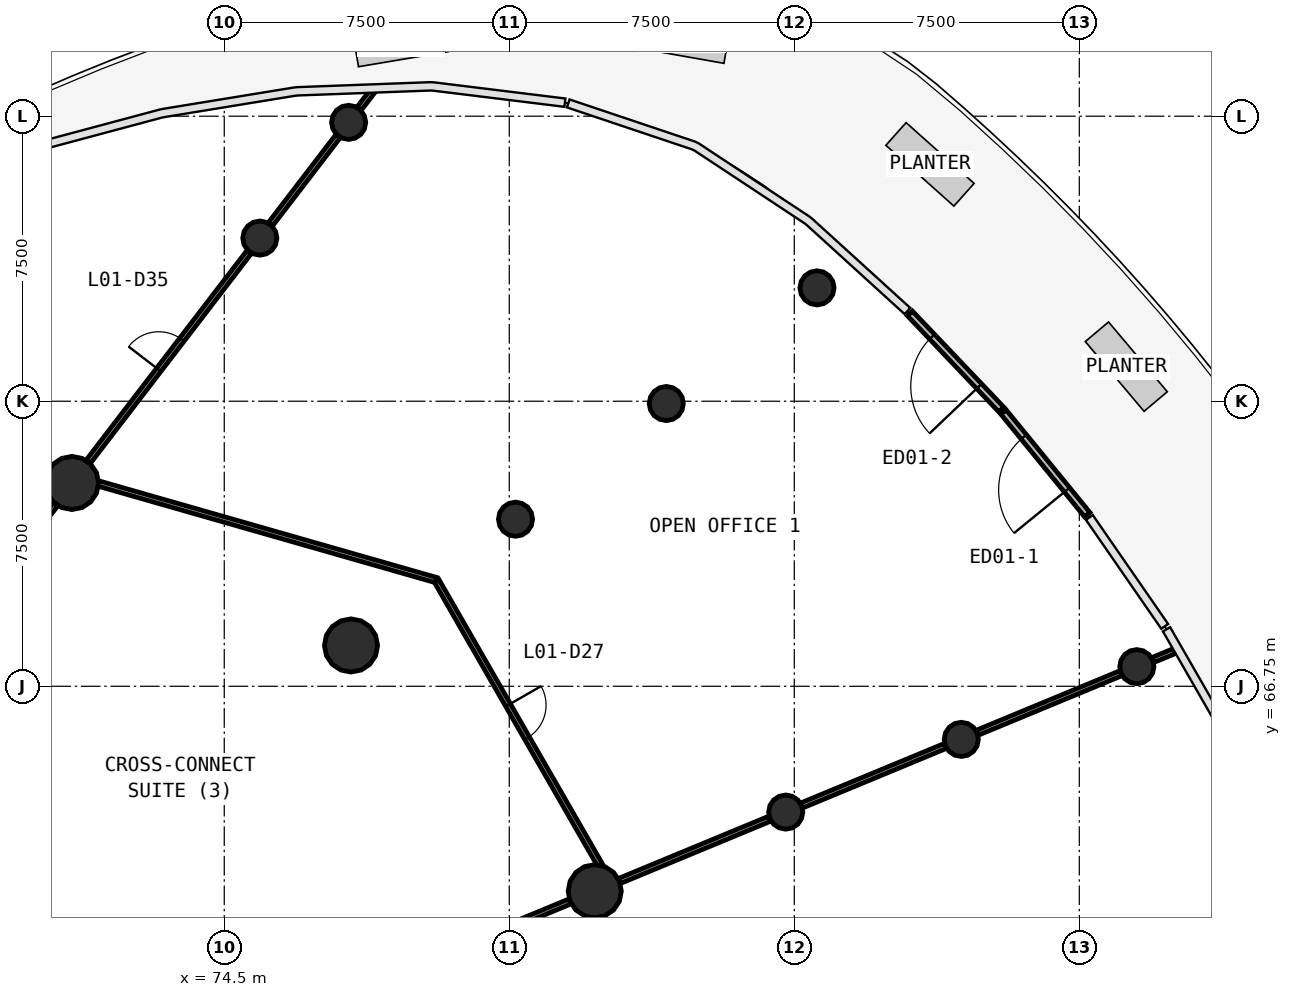
"""IFC4 building model, lengths in metres.
Left out: names, types, materials, properties, quantities, classifications, styles, units other than length and angle.
Written with IfcOpenShell. Run it as: python <this file> out.ifc"""

import sys

from ifc_helpers import new_model, si_unit, direction, frame, frame_2d, origin, origin_2d, place, context, subcontext, project, spatial, rectangle, circle, extrude, source, transform, mapped, element, fill, save


model = new_model("IFC4")
c1 = context("Model", 3, precision=1e-05, world=origin(), true_north=direction((0.0, 1.0)))
c2 = subcontext(c1, "Body", "Model", "MODEL_VIEW")
j1 = project(units=[si_unit("LENGTHUNIT", "METRE"), si_unit("PLANEANGLEUNIT", "RADIAN")], contexts=[c1])
p1 = place(None, origin())
s1 = spatial("IfcSite", under=j1, at=p1, CompositionType="ELEMENT")
p2 = place(p1, origin())
s2 = spatial("IfcBuilding", under=s1, at=p2, CompositionType="ELEMENT")
p3 = place(p2, frame((0.0, 0.0, 5.0)))
s3 = spatial("IfcBuildingStorey", under=s2, at=p3, CompositionType="ELEMENT", Elevation=5.0)
m1 = source(origin(), c2, "Body", "SweptSolid", [
    extrude(circle(Radius=0.7, at=origin_2d()), origin(), (0.0, 0.0, 1.0), 4.4),
])
for number, where, z_axis, x_axis in (
    (1, (84.249, 61.358, 0.0), (0.0, 0.0, 1.0), (1.0, 0.0, 0.0)),
    (2, (77.836, 67.824, 0.0), (0.0, 0.0, 1.0), (1.0, 0.0, 0.0)),
    (3, (70.492, 72.1, 0.0), (0.0, 0.0, 1.0), (1.0, 0.0, 0.0)),
):
    element("IfcColumn", number, at=place(p3, frame(where, z_axis=z_axis, x_axis=x_axis)), inside=s3, PredefinedType="COLUMN", context=c2, shape_type="MappedRepresentation", body=[
        mapped(m1, transform((0.0, 0.0, 0.0), scale=1.0)),
    ])
m2 = source(origin(), c2, "Body", "SweptSolid", [
    extrude(circle(Radius=0.45, at=origin_2d()), origin(), (0.0, 0.0, 1.0), 4.05),
])
for number, where, z_axis, x_axis in (
    (4, (98.513, 67.266, 0.0), (0.0, 0.0, 1.0), (1.0, 0.0, 0.0)),
    (5, (90.098, 77.233, 0.0), (0.0, 0.0, 1.0), (1.0, 0.0, 0.0)),
    (6, (77.773, 81.588, 0.0), (0.0, 0.0, 1.0), (1.0, 0.0, 0.0)),
):
    element("IfcColumn", number, at=place(p3, frame(where, z_axis=z_axis, x_axis=x_axis)), inside=s3, PredefinedType="COLUMN", context=c2, shape_type="MappedRepresentation", body=[
        mapped(m2, transform((0.0, 0.0, 0.0), scale=1.0)),
    ])
m3 = source(origin(), c2, "Body", "SweptSolid", [
    extrude(circle(Radius=0.45, at=origin_2d()), origin(), (0.0, 0.0, 1.0), 4.4),
])
for number, where, z_axis, x_axis in (
    (7, (93.894, 65.353, 0.0), (0.0, 0.0, 1.0), (1.0, 0.0, 0.0)),
    (8, (86.131, 74.19, 0.0), (0.0, 0.0, 1.0), (1.0, 0.0, 0.0)),
    (9, (75.436, 78.543, 0.0), (0.0, 0.0, 1.0), (1.0, 0.0, 0.0)),
    (10, (89.275, 63.44, 0.0), (0.0, 0.0, 1.0), (1.0, 0.0, 0.0)),
    (11, (82.165, 71.146, 0.0), (0.0, 0.0, 1.0), (1.0, 0.0, 0.0)),
):
    element("IfcColumn", number, at=place(p3, frame(where, z_axis=z_axis, x_axis=x_axis)), inside=s3, PredefinedType="COLUMN", context=c2, shape_type="MappedRepresentation", body=[
        mapped(m3, transform((0.0, 0.0, 0.0), scale=1.0)),
    ])
p4 = place(p3, frame((97.21, 71.265, 0.0), z_axis=(0.0, 0.0, 1.0), x_axis=(-0.632333608818, 0.77469620314, 0.0)))
e12 = element("IfcWall", 12, at=p4, inside=s3, PredefinedType="STANDARD", context=c2, shape_type="SweptSolid", body=[
    extrude(rectangle(XDim=3.486, YDim=0.18, at=frame_2d((1.743, 0.0))), origin(), (0.0, 0.0, 1.0), 4.05),
])
p5 = place(p4, frame((0.843, 0.0, 0.0)))
e13 = element("IfcOpeningElement", 13, at=p5, cuts=e12, PredefinedType="OPENING", context=c2, shape_type="SweptSolid", body=[
    extrude(rectangle(XDim=1.8, YDim=2.4, at=frame_2d((0.9, 1.2))), frame((0.0, 0.1, 0.0), z_axis=(0.0, -1.0, 0.0), x_axis=(1.0, 0.0, 0.0)), (0.0, 0.0, 1.0), 0.2),
])
p6 = place(p3, frame((94.946, 74.033, 0.0), z_axis=(0.0, 0.0, 1.0), x_axis=(-0.689168934046, 0.724600704075, 0.0)))
e14 = element("IfcWall", 14, at=p6, inside=s3, PredefinedType="STANDARD", context=c2, shape_type="SweptSolid", body=[
    extrude(rectangle(XDim=3.487, YDim=0.18, at=frame_2d((1.743, 0.0))), origin(), (0.0, 0.0, 1.0), 4.05),
])
p7 = place(p6, frame((0.843, 0.0, 0.0)))
e15 = element("IfcOpeningElement", 15, at=p7, cuts=e14, PredefinedType="OPENING", context=c2, shape_type="SweptSolid", body=[
    extrude(rectangle(XDim=1.8, YDim=2.4, at=frame_2d((0.9, 1.2))), frame((0.0, 0.1, 0.0), z_axis=(0.0, -1.0, 0.0), x_axis=(1.0, 0.0, 0.0)), (0.0, 0.0, 1.0), 0.2),
])
p8 = place(p3, frame((80.076, 69.544, 0.0), z_axis=(0.0, 0.0, 1.0), x_axis=(-0.961447102661, 0.27498994306, 0.0)))
e16 = element("IfcWall", 16, at=p8, inside=s3, PredefinedType="PARTITIONING", context=c2, shape_type="SweptSolid", body=[
    extrude(rectangle(XDim=9.236, YDim=0.14, at=frame_2d((4.618, 0.0))), origin(), (0.0, 0.0, 1.0), 3.25),
])
p9 = place(p3, frame((80.091, 69.518, 0.0), z_axis=(0.0, 0.0, 1.0), x_axis=(0.498474851257, -0.866904160023, 0.0)))
e17 = element("IfcWall", 17, at=p9, inside=s3, PredefinedType="PARTITIONING", context=c2, shape_type="SweptSolid", body=[
    extrude(rectangle(XDim=8.615, YDim=0.14, at=frame_2d((4.308, 0.0))), origin(), (0.0, 0.0, 1.0), 3.25),
])
p10 = place(p9, frame((3.765, 0.0, 0.0)))
e18 = element("IfcOpeningElement", 18, at=p10, cuts=e17, PredefinedType="OPENING", context=c2, shape_type="SweptSolid", body=[
    extrude(rectangle(XDim=1.0, YDim=2.1, at=frame_2d((0.5, 1.05))), frame((0.0, 0.08, 0.0), z_axis=(0.0, -1.0, 0.0), x_axis=(1.0, 0.0, 0.0)), (0.0, 0.0, 1.0), 0.16),
])
p11 = place(p3, frame((70.921, 72.658, 0.0), z_axis=(0.0, 0.0, 1.0), x_axis=(0.608788506125, 0.793332562555, 0.0)))
e19 = element("IfcWall", 19, at=p11, inside=s3, PredefinedType="PARTITIONING", context=c2, shape_type="SweptSolid", body=[
    extrude(rectangle(XDim=6.963, YDim=0.14, at=frame_2d((3.481, 0.0))), origin(), (0.0, 0.0, 1.0), 3.25),
])
p12 = place(p11, frame((3.05, 0.0, 0.0)))
e20 = element("IfcOpeningElement", 20, at=p12, cuts=e19, PredefinedType="OPENING", context=c2, shape_type="SweptSolid", body=[
    extrude(rectangle(XDim=1.0, YDim=2.1, at=frame_2d((0.5, 1.05))), frame((0.0, 0.08, 0.0), z_axis=(0.0, -1.0, 0.0), x_axis=(1.0, 0.0, 0.0)), (0.0, 0.0, 1.0), 0.16),
])
p13 = place(p3, frame((65.909, 66.127, 0.0), z_axis=(0.0, 0.0, 1.0), x_axis=(0.608773229352, 0.79334428543, 0.0)))
e21 = element("IfcWall", 21, at=p13, inside=s3, PredefinedType="PARTITIONING", context=c2, shape_type="SweptSolid", body=[
    extrude(rectangle(XDim=6.824, YDim=0.14, at=frame_2d((3.412, 0.0))), origin(), (0.0, 0.0, 1.0), 3.25),
])
p14 = place(p3, frame((78.669, 59.047, 0.0), z_axis=(0.0, 0.0, 1.0), x_axis=(0.923891330959, 0.382654947151, 0.0)))
e22 = element("IfcWall", 22, at=p14, inside=s3, PredefinedType="PARTITIONING", context=c2, shape_type="SweptSolid", body=[
    extrude(rectangle(XDim=5.334, YDim=0.14, at=frame_2d((2.667, 0.0))), origin(), (0.0, 0.0, 1.0), 3.25),
])
p15 = place(p3, frame((84.9, 61.628, 0.0), z_axis=(0.0, 0.0, 1.0), x_axis=(0.923871522787, 0.382702768979, 0.0)))
e23 = element("IfcWall", 23, at=p15, inside=s3, PredefinedType="PARTITIONING", context=c2, shape_type="SweptSolid", body=[
    extrude(rectangle(XDim=4.28, YDim=0.14, at=frame_2d((2.14, 0.0))), origin(), (0.0, 0.0, 1.0), 3.25),
])
p16 = place(p3, frame((94.314, 65.527, 0.0), z_axis=(0.0, 0.0, 1.0), x_axis=(0.923874959136, 0.382694473284, 0.0)))
e24 = element("IfcWall", 24, at=p16, inside=s3, PredefinedType="PARTITIONING", context=c2, shape_type="SweptSolid", body=[
    extrude(rectangle(XDim=4.09, YDim=0.14, at=frame_2d((2.045, 0.0))), origin(), (0.0, 0.0, 1.0), 3.25),
])
p17 = place(p3, frame((89.695, 63.614, 0.0), z_axis=(0.0, 0.0, 1.0), x_axis=(0.92386621601, 0.382715579661, 0.0)))
e25 = element("IfcWall", 25, at=p17, inside=s3, PredefinedType="PARTITIONING", context=c2, shape_type="SweptSolid", body=[
    extrude(rectangle(XDim=4.09, YDim=0.14, at=frame_2d((2.045, 0.0))), origin(), (0.0, 0.0, 1.0), 3.25),
])
p18 = place(p3, frame((75.713, 78.903, 0.0), z_axis=(0.0, 0.0, 1.0), x_axis=(0.608804147927, 0.793320559085, 0.0)))
e26 = element("IfcWall", 26, at=p18, inside=s3, PredefinedType="PARTITIONING", context=c2, shape_type="SweptSolid", body=[
    extrude(rectangle(XDim=2.929, YDim=0.14, at=frame_2d((1.465, 0.0))), origin(), (0.0, 0.0, 1.0), 3.25),
])
p19 = place(p3, frame((98.934, 67.44, 0.0), z_axis=(0.0, 0.0, 1.0), x_axis=(0.923725485177, 0.383055124016, 0.0)))
e27 = element("IfcWall", 27, at=p19, inside=s3, PredefinedType="PARTITIONING", context=c2, shape_type="SweptSolid", body=[
    extrude(rectangle(XDim=0.634, YDim=0.14, at=frame_2d((0.317, 0.0))), origin(), (0.0, 0.0, 1.0), 3.25),
])
p20 = place(p3, frame((78.05, 81.948, 0.0), z_axis=(0.0, 0.0, 1.0), x_axis=(0.608753749501, 0.793359232926, 0.0)))
e28 = element("IfcWall", 28, at=p20, inside=s3, PredefinedType="PARTITIONING", context=c2, shape_type="SweptSolid", body=[
    extrude(rectangle(XDim=0.604, YDim=0.14, at=frame_2d((0.302, 0.0))), origin(), (0.0, 0.0, 1.0), 3.25),
])
m4 = source(origin(), c2, "Body", "SweptSolid", [
    extrude(rectangle(XDim=1.8, YDim=2.4, at=frame_2d((0.9, 1.2))), frame((0.0, 0.025, 0.0), z_axis=(0.0, -1.0, 0.0), x_axis=(1.0, 0.0, 0.0)), (0.0, 0.0, 1.0), 0.05),
])
p21 = place(p5, origin())
e29 = element("IfcDoor", 29, at=p21, inside=s3, OperationType="DOUBLE_DOOR_SINGLE_SWING", PredefinedType="DOOR", context=c2, shape_type="MappedRepresentation", body=[
    mapped(m4, transform((0.0, 0.0, 0.0), scale=1.0)),
])
fill(e13, e29)
p22 = place(p7, origin())
e30 = element("IfcDoor", 30, at=p22, inside=s3, OperationType="DOUBLE_DOOR_SINGLE_SWING", PredefinedType="DOOR", context=c2, shape_type="MappedRepresentation", body=[
    mapped(m4, transform((0.0, 0.0, 0.0), scale=1.0)),
])
fill(e15, e30)
m5 = source(origin(), c2, "Body", "SweptSolid", [
    extrude(rectangle(XDim=1.0, YDim=2.1, at=frame_2d((0.5, 1.05))), frame((0.0, 0.025, 0.0), z_axis=(0.0, -1.0, 0.0), x_axis=(1.0, 0.0, 0.0)), (0.0, 0.0, 1.0), 0.05),
])
p23 = place(p10, origin())
e31 = element("IfcDoor", 31, at=p23, inside=s3, OperationType="SINGLE_SWING_LEFT", PredefinedType="DOOR", context=c2, shape_type="MappedRepresentation", body=[
    mapped(m5, transform((0.0, 0.0, 0.0), scale=1.0)),
])
fill(e18, e31)
p24 = place(p12, origin())
e32 = element("IfcDoor", 32, at=p24, inside=s3, OperationType="SINGLE_SWING_LEFT", PredefinedType="DOOR", context=c2, shape_type="MappedRepresentation", body=[
    mapped(m5, transform((0.0, 0.0, 0.0), scale=1.0)),
])
fill(e20, e32)
save(model, sys.argv[1])
